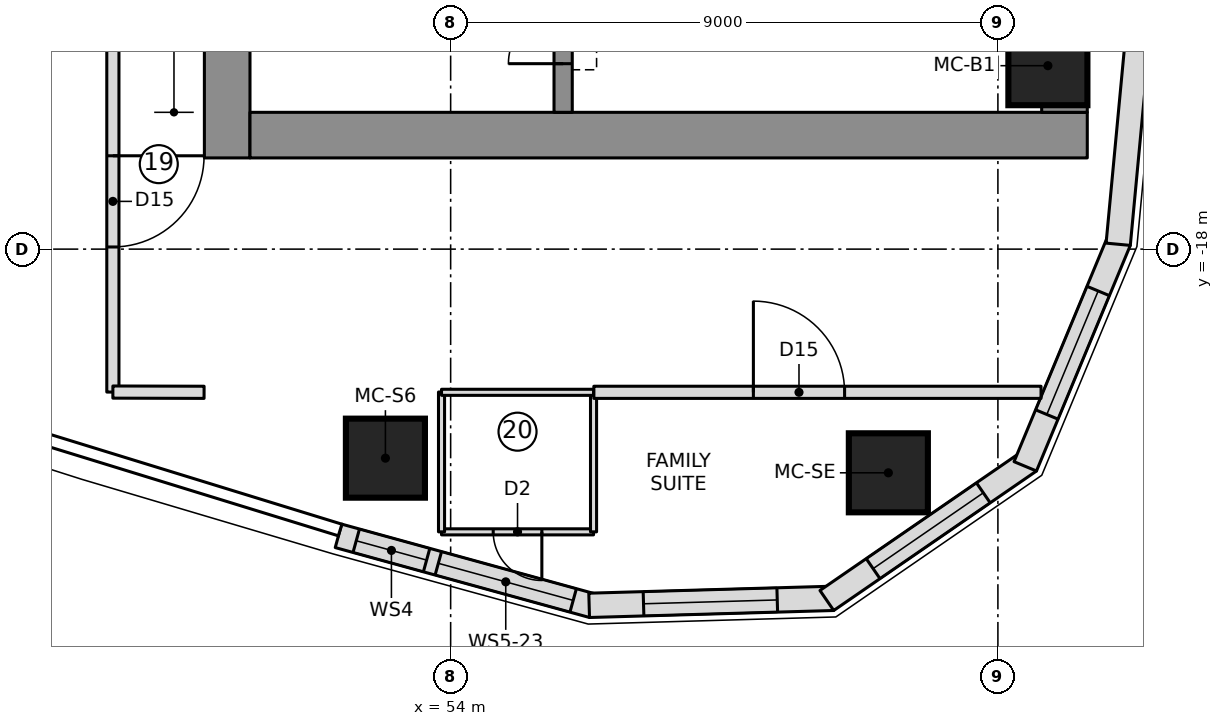
"""IFC4 building model, lengths in metres.
Left out: names, types, materials, properties, quantities, classifications, styles, units other than length and angle.
Written with IfcOpenShell. Run it as: python <this file> out.ifc"""

import sys

from ifc_helpers import new_model, si_unit, direction, frame, frame_2d, origin, origin_2d, place, context, subcontext, project, spatial, polyline, rectangle, outline, extrude, element, fill, save


model = new_model("IFC4")
c1 = context("Model", 3, precision=1e-05, world=origin(), true_north=direction((0.0, 1.0)))
c2 = subcontext(c1, "Body", "Model", "MODEL_VIEW")
j1 = project(units=[si_unit("LENGTHUNIT", "METRE"), si_unit("PLANEANGLEUNIT", "RADIAN")], contexts=[c1])
p1 = place(None, origin())
s1 = spatial("IfcSite", under=j1, at=p1, CompositionType="ELEMENT")
p2 = place(p1, origin())
s2 = spatial("IfcBuilding", under=s1, at=p2, CompositionType="ELEMENT")
p3 = place(p2, frame((0.0, 0.0, 186.15)))
s3 = spatial("IfcBuildingStorey", under=s2, at=p3, CompositionType="ELEMENT", Elevation=186.15)
p4 = place(p3, frame((50.325, -16.5, 0.0), z_axis=(0.0, 0.0, 1.0), x_axis=(0.0, 1.0, 0.0)))
e1 = element("IfcWall", 1, at=p4, inside=s3, PredefinedType="SHEAR", context=c2, shape_type="SweptSolid", body=[
    extrude(rectangle(XDim=9.85, YDim=0.75, at=frame_2d((4.925, 0.0))), origin(), (0.0, 0.0, 1.0), 3.55),
])
p5 = place(p4, frame((2.25, 0.0, 0.0)))
e2 = element("IfcOpeningElement", 2, at=p5, cuts=e1, PredefinedType="OPENING", context=c2, shape_type="SweptSolid", body=[
    extrude(rectangle(XDim=1.1, YDim=2.1, at=frame_2d((0.55, 1.05))), frame((0.0, 0.385, 0.0), z_axis=(0.0, -1.0, 0.0), x_axis=(1.0, 0.0, 0.0)), (0.0, 0.0, 1.0), 0.77),
])
p6 = place(p3, frame((50.7, -16.125, 0.0), z_axis=(0.0, 0.0, 1.0), x_axis=(1.0, 0.0, 0.0)))
e3 = element("IfcWall", 3, at=p6, inside=s3, PredefinedType="SHEAR", context=c2, shape_type="SweptSolid", body=[
    extrude(rectangle(XDim=13.77, YDim=0.75, at=frame_2d((6.885, 0.0))), origin(), (0.0, 0.0, 1.0), 3.55),
])
p7 = place(p3, frame((64.095, -15.75, 0.0), z_axis=(0.0, 0.0, 1.0), x_axis=(0.0, 1.0, 0.0)))
e4 = element("IfcWall", 4, at=p7, inside=s3, PredefinedType="SHEAR", context=c2, shape_type="SweptSolid", body=[
    extrude(rectangle(XDim=7.651, YDim=0.75, at=frame_2d((3.825, 0.0))), origin(), (0.0, 0.0, 1.0), 3.55),
])
p8 = place(p3, frame((55.85, -15.75, 0.0), z_axis=(0.0, 0.0, 1.0), x_axis=(0.0, 1.0, 0.0)))
e5 = element("IfcWall", 5, at=p8, inside=s3, PredefinedType="SHEAR", context=c2, shape_type="SweptSolid", body=[
    extrude(rectangle(XDim=5.4, YDim=0.3, at=frame_2d((2.7, 0.0))), origin(), (0.0, 0.0, 1.0), 3.55),
])
p9 = place(p8, frame((3.6, 0.0, 0.0)))
e6 = element("IfcOpeningElement", 6, at=p9, cuts=e5, PredefinedType="OPENING", context=c2, shape_type="SweptSolid", body=[
    extrude(rectangle(XDim=1.1, YDim=2.1, at=frame_2d((0.55, 1.05))), frame((0.0, 0.16, 0.0), z_axis=(0.0, -1.0, 0.0), x_axis=(1.0, 0.0, 0.0)), (0.0, 0.0, 1.0), 0.32),
])
p10 = place(p8, frame((0.8, 0.0, 0.0)))
e7 = element("IfcOpeningElement", 7, at=p10, cuts=e5, PredefinedType="OPENING", context=c2, shape_type="SweptSolid", body=[
    extrude(rectangle(XDim=0.9, YDim=2.1, at=frame_2d((0.45, 1.05))), frame((0.0, 0.16, 0.0), z_axis=(0.0, -1.0, 0.0), x_axis=(1.0, 0.0, 0.0)), (0.0, 0.0, 1.0), 0.32),
])
for number, where, z_axis, x_axis in (
    (8, (52.927, -21.438, 0.0), (0.0, 0.0, 1.0), (1.0, 0.0, 0.0)),
    (9, (61.198, -21.679, 0.0), (0.0, 0.0, 1.0), (1.0, 0.0, 0.0)),
    (10, (63.822, -14.983, 0.0), (0.0, 0.0, 1.0), (1.0, 0.0, 0.0)),
):
    element("IfcColumn", number, at=place(p3, frame(where, z_axis=z_axis, x_axis=x_axis)), inside=s3, PredefinedType="COLUMN", context=c2, shape_type="SweptSolid", body=[
        extrude(rectangle(XDim=1.3, YDim=1.3, at=origin_2d()), origin(), (0.0, 0.0, 1.0), 3.55),
    ])
p11 = place(p3, frame((52.155, -22.716, 0.0), z_axis=(0.0, 0.0, 1.0), x_axis=(0.964205755089, -0.265155165617, 0.0)))
e11 = element("IfcWall", 11, at=p11, inside=s3, PredefinedType="NOTDEFINED", context=c2, shape_type="SweptSolid", body=[
    extrude(outline(polyline([(0.0, -0.2), (4.337, -0.2), (4.277, 0.2), (0.0, 0.2), (0.0, -0.2)])), origin(), (0.0, 0.0, 1.0), 3.25),
])
p12 = place(p11, frame((0.303, 0.0, 0.9)))
e12 = element("IfcOpeningElement", 12, at=p12, cuts=e11, PredefinedType="OPENING", context=c2, shape_type="SweptSolid", body=[
    extrude(rectangle(XDim=1.2, YDim=1.8, at=frame_2d((0.6, 0.9))), frame((0.0, 0.21, 0.0), z_axis=(0.0, -1.0, 0.0), x_axis=(1.0, 0.0, 0.0)), (0.0, 0.0, 1.0), 0.42),
])
p13 = place(p11, frame((1.704, 0.0, 0.9)))
e13 = element("IfcOpeningElement", 13, at=p13, cuts=e11, PredefinedType="OPENING", context=c2, shape_type="SweptSolid", body=[
    extrude(rectangle(XDim=2.3, YDim=1.8, at=frame_2d((1.15, 0.9))), frame((0.0, 0.21, 0.0), z_axis=(0.0, -1.0, 0.0), x_axis=(1.0, 0.0, 0.0)), (0.0, 0.0, 1.0), 0.42),
])
p14 = place(p3, frame((56.308, -23.858, 0.0), z_axis=(0.0, 0.0, 1.0), x_axis=(0.999587920197, 0.028705222472, 0.0)))
e14 = element("IfcWall", 14, at=p14, inside=s3, PredefinedType="NOTDEFINED", context=c2, shape_type="SweptSolid", body=[
    extrude(outline(polyline([(-0.03, -0.2), (3.989, -0.2), (3.87, 0.2), (0.03, 0.2), (-0.03, -0.2)])), origin(), (0.0, 0.0, 1.0), 3.25),
])
p15 = place(p14, frame((0.865, 0.0, 0.6)))
e15 = element("IfcOpeningElement", 15, at=p15, cuts=e14, PredefinedType="OPENING", context=c2, shape_type="SweptSolid", body=[
    extrude(outline(polyline([(0.0, 1.35), (0.084, 1.771), (0.322, 2.128), (0.679, 2.366), (1.1, 2.45), (1.521, 2.366), (1.878, 2.128), (2.116, 1.771), (2.2, 1.35), (2.2, 1.1), (2.116, 0.679), (1.878, 0.322), (1.521, 0.084), (1.1, 0.0), (0.679, 0.084), (0.322, 0.322), (0.084, 0.679), (0.0, 1.1), (0.0, 1.35)])), frame((0.0, 0.21, 0.0), z_axis=(0.0, -1.0, 0.0), x_axis=(1.0, 0.0, 0.0)), (0.0, 0.0, 1.0), 0.42),
])
p16 = place(p3, frame((60.236, -23.745, 0.0), z_axis=(0.0, 0.0, 1.0), x_axis=(0.823806162588, 0.566871596115, 0.0)))
e16 = element("IfcWall", 16, at=p16, inside=s3, PredefinedType="NOTDEFINED", context=c2, shape_type="SweptSolid", body=[
    extrude(outline(polyline([(-0.059, -0.2), (3.988, -0.2), (3.87, 0.2), (0.059, 0.2), (-0.059, -0.2)])), origin(), (0.0, 0.0, 1.0), 3.25),
])
p17 = place(p16, frame((0.865, 0.0, 0.6)))
e17 = element("IfcOpeningElement", 17, at=p17, cuts=e16, PredefinedType="OPENING", context=c2, shape_type="SweptSolid", body=[
    extrude(outline(polyline([(0.0, 1.35), (0.084, 1.771), (0.322, 2.128), (0.679, 2.366), (1.1, 2.45), (1.521, 2.366), (1.878, 2.128), (2.116, 1.771), (2.2, 1.35), (2.2, 1.1), (2.116, 0.679), (1.878, 0.322), (1.521, 0.084), (1.1, 0.0), (0.679, 0.084), (0.322, 0.322), (0.084, 0.679), (0.0, 1.1), (0.0, 1.35)])), frame((0.0, 0.21, 0.0), z_axis=(0.0, -1.0, 0.0), x_axis=(1.0, 0.0, 0.0)), (0.0, 0.0, 1.0), 0.42),
])
p18 = place(p3, frame((63.472, -21.518, 0.0), z_axis=(0.0, 0.0, 1.0), x_axis=(0.383997619794, 0.923334082547, 0.0)))
e18 = element("IfcWall", 18, at=p18, inside=s3, PredefinedType="NOTDEFINED", context=c2, shape_type="SweptSolid", body=[
    extrude(outline(polyline([(-0.059, -0.2), (3.959, -0.2), (3.899, 0.2), (0.059, 0.2), (-0.059, -0.2)])), origin(), (0.0, 0.0, 1.0), 3.25),
])
p19 = place(p18, frame((0.865, 0.0, 0.6)))
e19 = element("IfcOpeningElement", 19, at=p19, cuts=e18, PredefinedType="OPENING", context=c2, shape_type="SweptSolid", body=[
    extrude(outline(polyline([(0.0, 1.35), (0.084, 1.771), (0.322, 2.128), (0.679, 2.366), (1.1, 2.45), (1.521, 2.366), (1.878, 2.128), (2.116, 1.771), (2.2, 1.35), (2.2, 1.1), (2.116, 0.679), (1.878, 0.322), (1.521, 0.084), (1.1, 0.0), (0.679, 0.084), (0.322, 0.322), (0.084, 0.679), (0.0, 1.1), (0.0, 1.35)])), frame((0.0, 0.21, 0.0), z_axis=(0.0, -1.0, 0.0), x_axis=(1.0, 0.0, 0.0)), (0.0, 0.0, 1.0), 0.42),
])
p20 = place(p3, frame((64.981, -17.89, 0.0), z_axis=(0.0, 0.0, 1.0), x_axis=(0.093605694738, 0.995609348044, 0.0)))
e20 = element("IfcWall", 20, at=p20, inside=s3, PredefinedType="NOTDEFINED", context=c2, shape_type="SweptSolid", body=[
    extrude(outline(polyline([(-0.03, -0.2), (4.484, -0.2), (4.478, 0.2), (0.03, 0.2), (-0.03, -0.2)])), origin(), (0.0, 0.0, 1.0), 3.25),
])
p21 = place(p3, frame((56.35, -22.65, 0.0), z_axis=(0.0, 0.0, 1.0), x_axis=(-1.0, 0.0, 0.0)))
e21 = element("IfcWall", 21, at=p21, inside=s3, PredefinedType="PARTITIONING", context=c2, shape_type="SweptSolid", body=[
    extrude(rectangle(XDim=2.5, YDim=0.1, at=frame_2d((1.25, 0.0))), origin(), (0.0, 0.0, 1.0), 3.25),
])
p22 = place(p21, frame((0.85, 0.0, 0.0)))
e22 = element("IfcOpeningElement", 22, at=p22, cuts=e21, PredefinedType="OPENING", context=c2, shape_type="SweptSolid", body=[
    extrude(rectangle(XDim=0.8, YDim=2.1, at=frame_2d((0.4, 1.05))), frame((0.0, 0.06, 0.0), z_axis=(0.0, -1.0, 0.0), x_axis=(1.0, 0.0, 0.0)), (0.0, 0.0, 1.0), 0.12),
])
for number, where, z_axis, x_axis in (
    (23, (53.85, -22.65, 0.0), (0.0, 0.0, 1.0), (0.0, 1.0, 0.0)),
    (24, (56.35, -20.35, 0.0), (0.0, 0.0, 1.0), (0.0, -1.0, 0.0)),
):
    element("IfcWall", number, at=place(p3, frame(where, z_axis=z_axis, x_axis=x_axis)), inside=s3, PredefinedType="PARTITIONING", context=c2, shape_type="SweptSolid", body=[
        extrude(rectangle(XDim=2.3, YDim=0.1, at=frame_2d((1.15, 0.0))), origin(), (0.0, 0.0, 1.0), 3.25),
    ])
p23 = place(p3, frame((56.355, -20.355, 0.0), z_axis=(0.0, 0.0, 1.0), x_axis=(1.0, 0.0, 0.0)))
e25 = element("IfcWall", 25, at=p23, inside=s3, PredefinedType="PARTITIONING", context=c2, shape_type="SweptSolid", body=[
    extrude(rectangle(XDim=7.354, YDim=0.2, at=frame_2d((3.677, 0.0))), origin(), (0.0, 0.0, 1.0), 3.25),
])
p24 = place(p23, frame((2.624, 0.0, 0.0)))
e26 = element("IfcOpeningElement", 26, at=p24, cuts=e25, PredefinedType="OPENING", context=c2, shape_type="SweptSolid", body=[
    extrude(rectangle(XDim=1.5, YDim=2.1, at=frame_2d((0.75, 1.05))), frame((0.0, 0.11, 0.0), z_axis=(0.0, -1.0, 0.0), x_axis=(1.0, 0.0, 0.0)), (0.0, 0.0, 1.0), 0.22),
])
p25 = place(p3, frame((53.85, -20.355, 0.0), z_axis=(0.0, 0.0, 1.0), x_axis=(1.0, 0.0, 0.0)))
e27 = element("IfcWall", 27, at=p25, inside=s3, PredefinedType="PARTITIONING", context=c2, shape_type="SweptSolid", body=[
    extrude(rectangle(XDim=2.5, YDim=0.1, at=frame_2d((1.25, 0.0))), origin(), (0.0, 0.0, 1.0), 3.25),
])
p26 = place(p3, frame((48.445, -13.415, 0.0), z_axis=(0.0, 0.0, 1.0), x_axis=(0.0, -1.0, 0.0)))
e28 = element("IfcWall", 28, at=p26, inside=s3, PredefinedType="PARTITIONING", context=c2, shape_type="SweptSolid", body=[
    extrude(rectangle(XDim=6.936, YDim=0.2, at=frame_2d((3.468, 0.0))), origin(), (0.0, 0.0, 1.0), 3.25),
])
p27 = place(p26, frame((3.05, 0.0, 0.0)))
e29 = element("IfcOpeningElement", 29, at=p27, cuts=e28, PredefinedType="OPENING", context=c2, shape_type="SweptSolid", body=[
    extrude(rectangle(XDim=1.5, YDim=2.1, at=frame_2d((0.75, 1.05))), frame((0.0, 0.11, 0.0), z_axis=(0.0, -1.0, 0.0), x_axis=(1.0, 0.0, 0.0)), (0.0, 0.0, 1.0), 0.22),
])
p28 = place(p3, frame((48.445, -20.351, 0.0), z_axis=(0.0, 0.0, 1.0), x_axis=(0.999996609175, -0.002604157836, 0.0)))
e30 = element("IfcWall", 30, at=p28, inside=s3, PredefinedType="PARTITIONING", context=c2, shape_type="SweptSolid", body=[
    extrude(rectangle(XDim=1.5, YDim=0.2, at=frame_2d((0.75, 0.0))), origin(), (0.0, 0.0, 1.0), 3.25),
])
p29 = place(p12, origin())
e31 = element("IfcWindow", 31, at=p29, inside=s3, PartitioningType="SINGLE_PANEL", PredefinedType="WINDOW", context=c2, shape_type="SweptSolid", body=[
    extrude(rectangle(XDim=1.2, YDim=1.8, at=frame_2d((0.6, 0.9))), frame((0.0, 0.17, 0.0), z_axis=(0.0, -1.0, 0.0), x_axis=(1.0, 0.0, 0.0)), (0.0, 0.0, 1.0), 0.06),
])
fill(e12, e31)
p30 = place(p13, origin())
e32 = element("IfcWindow", 32, at=p30, inside=s3, PartitioningType="SINGLE_PANEL", PredefinedType="WINDOW", context=c2, shape_type="SweptSolid", body=[
    extrude(rectangle(XDim=2.3, YDim=1.8, at=frame_2d((1.15, 0.9))), frame((0.0, 0.17, 0.0), z_axis=(0.0, -1.0, 0.0), x_axis=(1.0, 0.0, 0.0)), (0.0, 0.0, 1.0), 0.06),
])
fill(e13, e32)
p31 = place(p15, origin())
e33 = element("IfcWindow", 33, at=p31, inside=s3, PartitioningType="SINGLE_PANEL", PredefinedType="WINDOW", context=c2, shape_type="SweptSolid", body=[
    extrude(outline(polyline([(0.0, 1.35), (0.084, 1.771), (0.322, 2.128), (0.679, 2.366), (1.1, 2.45), (1.521, 2.366), (1.878, 2.128), (2.116, 1.771), (2.2, 1.35), (2.2, 1.1), (2.116, 0.679), (1.878, 0.322), (1.521, 0.084), (1.1, 0.0), (0.679, 0.084), (0.322, 0.322), (0.084, 0.679), (0.0, 1.1), (0.0, 1.35)])), frame((0.0, 0.17, 0.0), z_axis=(0.0, -1.0, 0.0), x_axis=(1.0, 0.0, 0.0)), (0.0, 0.0, 1.0), 0.06),
])
fill(e15, e33)
p32 = place(p17, origin())
e34 = element("IfcWindow", 34, at=p32, inside=s3, PartitioningType="SINGLE_PANEL", PredefinedType="WINDOW", context=c2, shape_type="SweptSolid", body=[
    extrude(outline(polyline([(0.0, 1.35), (0.084, 1.771), (0.322, 2.128), (0.679, 2.366), (1.1, 2.45), (1.521, 2.366), (1.878, 2.128), (2.116, 1.771), (2.2, 1.35), (2.2, 1.1), (2.116, 0.679), (1.878, 0.322), (1.521, 0.084), (1.1, 0.0), (0.679, 0.084), (0.322, 0.322), (0.084, 0.679), (0.0, 1.1), (0.0, 1.35)])), frame((0.0, 0.17, 0.0), z_axis=(0.0, -1.0, 0.0), x_axis=(1.0, 0.0, 0.0)), (0.0, 0.0, 1.0), 0.06),
])
fill(e17, e34)
p33 = place(p19, origin())
e35 = element("IfcWindow", 35, at=p33, inside=s3, PartitioningType="SINGLE_PANEL", PredefinedType="WINDOW", context=c2, shape_type="SweptSolid", body=[
    extrude(outline(polyline([(0.0, 1.35), (0.084, 1.771), (0.322, 2.128), (0.679, 2.366), (1.1, 2.45), (1.521, 2.366), (1.878, 2.128), (2.116, 1.771), (2.2, 1.35), (2.2, 1.1), (2.116, 0.679), (1.878, 0.322), (1.521, 0.084), (1.1, 0.0), (0.679, 0.084), (0.322, 0.322), (0.084, 0.679), (0.0, 1.1), (0.0, 1.35)])), frame((0.0, 0.17, 0.0), z_axis=(0.0, -1.0, 0.0), x_axis=(1.0, 0.0, 0.0)), (0.0, 0.0, 1.0), 0.06),
])
fill(e19, e35)
p34 = place(p22, origin())
e36 = element("IfcDoor", 36, at=p34, inside=s3, OperationType="SINGLE_SWING_LEFT", PredefinedType="DOOR", context=c2, shape_type="SweptSolid", body=[
    extrude(rectangle(XDim=0.8, YDim=2.1, at=frame_2d((0.4, 1.05))), frame((0.0, 0.025, 0.0), z_axis=(0.0, -1.0, 0.0), x_axis=(1.0, 0.0, 0.0)), (0.0, 0.0, 1.0), 0.05),
])
fill(e22, e36)
p35 = place(p24, origin())
e37 = element("IfcDoor", 37, at=p35, inside=s3, OperationType="DOUBLE_DOOR_SINGLE_SWING", PredefinedType="DOOR", context=c2, shape_type="SweptSolid", body=[
    extrude(rectangle(XDim=1.5, YDim=2.1, at=frame_2d((0.75, 1.05))), frame((0.0, 0.025, 0.0), z_axis=(0.0, -1.0, 0.0), x_axis=(1.0, 0.0, 0.0)), (0.0, 0.0, 1.0), 0.05),
])
fill(e26, e37)
p36 = place(p27, origin())
e38 = element("IfcDoor", 38, at=p36, inside=s3, OperationType="DOUBLE_DOOR_SINGLE_SWING", PredefinedType="DOOR", context=c2, shape_type="SweptSolid", body=[
    extrude(rectangle(XDim=1.5, YDim=2.1, at=frame_2d((0.75, 1.05))), frame((0.0, 0.025, 0.0), z_axis=(0.0, -1.0, 0.0), x_axis=(1.0, 0.0, 0.0)), (0.0, 0.0, 1.0), 0.05),
])
fill(e29, e38)
p37 = place(p10, origin())
e39 = element("IfcDoor", 39, at=p37, inside=s3, OperationType="SINGLE_SWING_LEFT", PredefinedType="DOOR", context=c2, shape_type="SweptSolid", body=[
    extrude(rectangle(XDim=0.9, YDim=2.1, at=frame_2d((0.45, 1.05))), frame((0.0, 0.025, 0.0), z_axis=(0.0, -1.0, 0.0), x_axis=(1.0, 0.0, 0.0)), (0.0, 0.0, 1.0), 0.05),
])
fill(e7, e39)
save(model, sys.argv[1])
